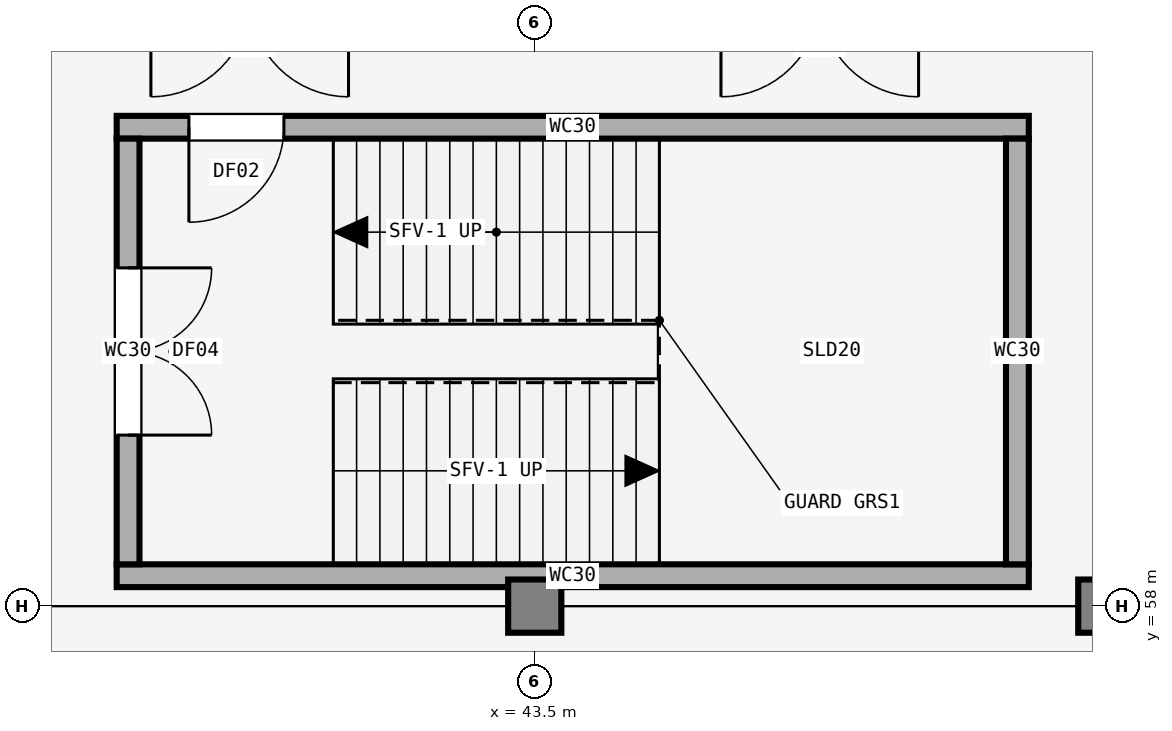
"""IFC4 building model, lengths in metres.
Left out: names, types, materials, properties, quantities, classifications, styles, units other than length and angle.
Written with IfcOpenShell. Run it as: python <this file> out.ifc"""

import sys

from ifc_helpers import new_model, si_unit, direction, frame, frame_2d, origin, origin_2d, place, context, subcontext, project, spatial, rectangle, extrude, element, fill, save


model = new_model("IFC4")
c1 = context("Model", 3, precision=1e-05, world=origin(), true_north=direction((0.0, 1.0)))
c2 = subcontext(c1, "Body", "Model", "MODEL_VIEW")
j1 = project(units=[si_unit("LENGTHUNIT", "METRE"), si_unit("PLANEANGLEUNIT", "RADIAN")], contexts=[c1])
p1 = place(None, origin())
s1 = spatial("IfcSite", under=j1, at=p1, CompositionType="ELEMENT")
p2 = place(p1, origin())
s2 = spatial("IfcBuilding", under=s1, at=p2, CompositionType="ELEMENT")
p3 = place(p2, origin())
s3 = spatial("IfcBuildingStorey", under=s2, at=p3, CompositionType="ELEMENT", Elevation=0.0)
for number, where, z_axis, x_axis in (
    (1, (43.5, 58.0, 0.0), (0.0, 0.0, 1.0), (1.0, 0.0, 0.0)),
    (2, (51.0, 58.0, 0.0), (0.0, 0.0, 1.0), (1.0, 0.0, 0.0)),
):
    element("IfcColumn", number, at=place(p3, frame(where, z_axis=z_axis, x_axis=x_axis)), inside=s3, PredefinedType="COLUMN", context=c2, shape_type="SweptSolid", body=[
        extrude(rectangle(XDim=0.7, YDim=0.7, at=origin_2d()), origin(), (0.0, 0.0, 1.0), 4.8),
    ])
p4 = place(p3, frame((38.0, 58.4, 0.0), z_axis=(0.0, 0.0, 1.0), x_axis=(1.0, 0.0, 0.0)))
e3 = element("IfcWall", 3, at=p4, inside=s3, PredefinedType="SHEAR", context=c2, shape_type="SweptSolid", body=[
    extrude(rectangle(XDim=12.0, YDim=0.3, at=frame_2d((6.0, 0.0))), origin(), (0.0, 0.0, 1.0), 4.8),
])
p5 = place(p3, frame((50.0, 64.3, 0.0), z_axis=(0.0, 0.0, 1.0), x_axis=(-1.0, 0.0, 0.0)))
e4 = element("IfcWall", 4, at=p5, inside=s3, PredefinedType="SHEAR", context=c2, shape_type="SweptSolid", body=[
    extrude(rectangle(XDim=12.0, YDim=0.3, at=frame_2d((6.0, 0.0))), origin(), (0.0, 0.0, 1.0), 4.8),
])
p6 = place(p5, frame((9.8, 0.0, 0.0)))
e5 = element("IfcOpeningElement", 5, at=p6, cuts=e4, PredefinedType="OPENING", context=c2, shape_type="SweptSolid", body=[
    extrude(rectangle(XDim=1.25, YDim=2.15, at=frame_2d((0.625, 1.075))), frame((0.0, 0.16, 0.0), z_axis=(0.0, -1.0, 0.0), x_axis=(1.0, 0.0, 0.0)), (0.0, 0.0, 1.0), 0.32),
])
p7 = place(p3, frame((38.15, 64.15, 0.0), z_axis=(0.0, 0.0, 1.0), x_axis=(0.0, -1.0, 0.0)))
e6 = element("IfcWall", 6, at=p7, inside=s3, PredefinedType="SHEAR", context=c2, shape_type="SweptSolid", body=[
    extrude(rectangle(XDim=5.6, YDim=0.3, at=frame_2d((2.8, 0.0))), origin(), (0.0, 0.0, 1.0), 4.8),
])
p8 = place(p7, frame((1.7, 0.0, 0.0)))
e7 = element("IfcOpeningElement", 7, at=p8, cuts=e6, PredefinedType="OPENING", context=c2, shape_type="SweptSolid", body=[
    extrude(rectangle(XDim=2.2, YDim=2.25, at=frame_2d((1.1, 1.125))), frame((0.0, 0.16, 0.0), z_axis=(0.0, -1.0, 0.0), x_axis=(1.0, 0.0, 0.0)), (0.0, 0.0, 1.0), 0.32),
])
p9 = place(p3, frame((49.85, 58.55, 0.0), z_axis=(0.0, 0.0, 1.0), x_axis=(0.0, 1.0, 0.0)))
e8 = element("IfcWall", 8, at=p9, inside=s3, PredefinedType="SHEAR", context=c2, shape_type="SweptSolid", body=[
    extrude(rectangle(XDim=5.6, YDim=0.3, at=frame_2d((2.8, 0.0))), origin(), (0.0, 0.0, 1.0), 4.8),
])
p10 = place(p8, origin())
e9 = element("IfcDoor", 9, at=p10, inside=s3, OperationType="DOUBLE_DOOR_SINGLE_SWING", PredefinedType="DOOR", context=c2, shape_type="SweptSolid", body=[
    extrude(rectangle(XDim=2.2, YDim=2.25, at=frame_2d((1.1, 1.125))), frame((0.0, 0.025, 0.0), z_axis=(0.0, -1.0, 0.0), x_axis=(1.0, 0.0, 0.0)), (0.0, 0.0, 1.0), 0.05),
])
fill(e7, e9)
p11 = place(p6, origin())
e10 = element("IfcDoor", 10, at=p11, inside=s3, OperationType="SINGLE_SWING_RIGHT", PredefinedType="DOOR", context=c2, shape_type="SweptSolid", body=[
    extrude(rectangle(XDim=1.25, YDim=2.15, at=frame_2d((0.625, 1.075))), frame((0.0, 0.025, 0.0), z_axis=(0.0, -1.0, 0.0), x_axis=(1.0, 0.0, 0.0)), (0.0, 0.0, 1.0), 0.05),
])
fill(e5, e10)
save(model, sys.argv[1])
